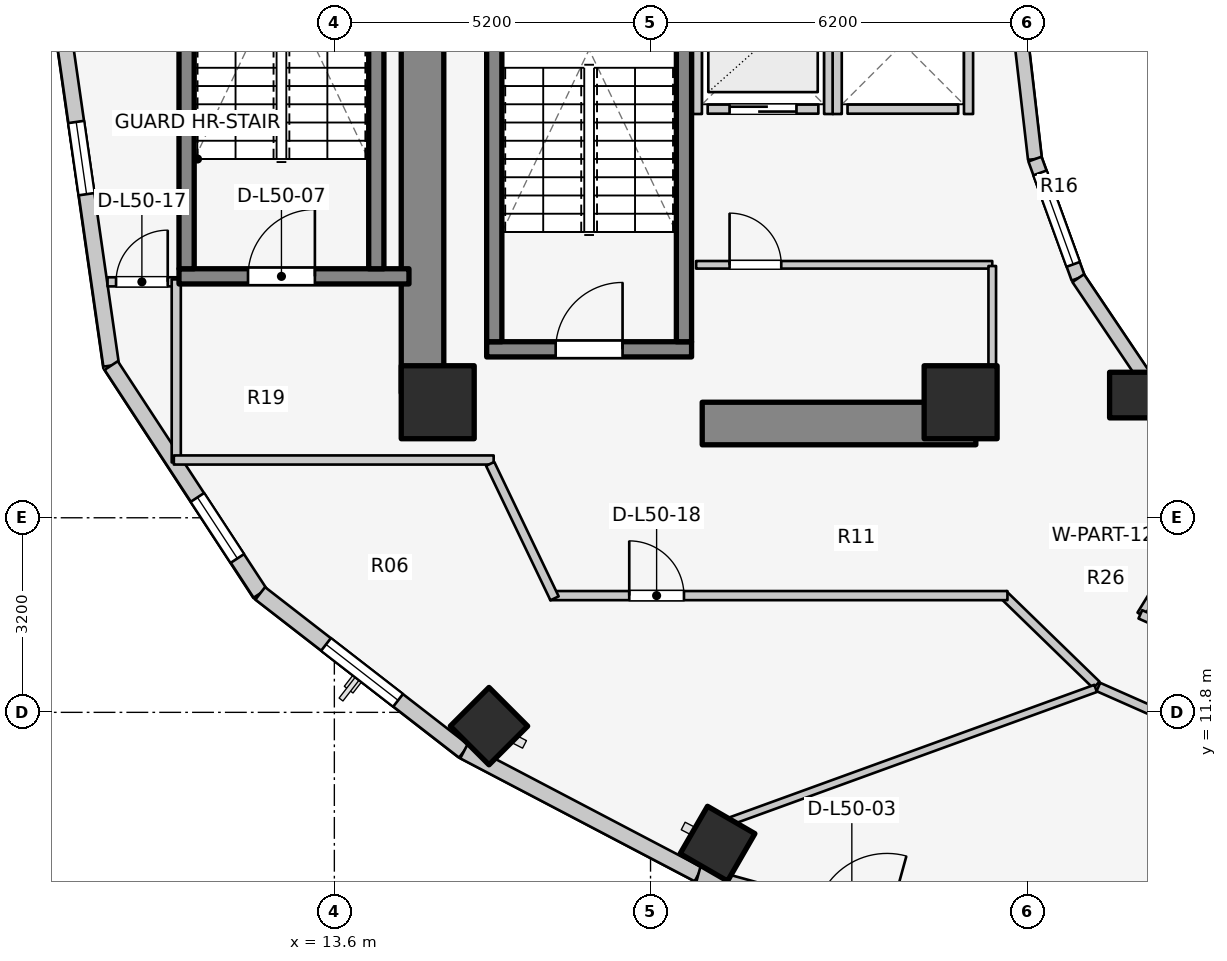
"""IFC4 building model, lengths in metres.
Left out: names, types, materials, properties, quantities, classifications, styles, units other than length and angle.
Written with IfcOpenShell. Run it as: python <this file> out.ifc"""

import sys

from ifc_helpers import new_model, si_unit, direction, frame, frame_2d, origin, origin_2d, place, context, subcontext, project, spatial, rectangle, extrude, element, fill, save


model = new_model("IFC4")
c1 = context("Model", 3, precision=1e-05, world=origin(), true_north=direction((0.0, 1.0)))
c2 = subcontext(c1, "Body", "Model", "MODEL_VIEW")
j1 = project(units=[si_unit("LENGTHUNIT", "METRE"), si_unit("PLANEANGLEUNIT", "RADIAN")], contexts=[c1])
p1 = place(None, origin())
s1 = spatial("IfcSite", under=j1, at=p1, CompositionType="ELEMENT")
p2 = place(p1, origin())
s2 = spatial("IfcBuilding", under=s1, at=p2, CompositionType="ELEMENT")
p3 = place(p2, frame((0.0, 0.0, 165.3)))
s3 = spatial("IfcBuildingStorey", under=s2, at=p3, CompositionType="ELEMENT", Elevation=165.3)
p4 = place(p3, frame((15.05, 17.05, 0.0), z_axis=(0.0, 0.0, 1.0), x_axis=(0.0, 1.0, 0.0)))
e1 = element("IfcWall", 1, at=p4, inside=s3, PredefinedType="SHEAR", context=c2, shape_type="SweptSolid", body=[
    extrude(rectangle(XDim=12.8, YDim=0.7, at=frame_2d((6.4, 0.0))), origin(), (0.0, 0.0, 1.0), 3.1),
])
p5 = place(p3, frame((19.65, 16.55, 0.0), z_axis=(0.0, 0.0, 1.0), x_axis=(1.0, 0.0, 0.0)))
e2 = element("IfcWall", 2, at=p5, inside=s3, PredefinedType="SHEAR", context=c2, shape_type="SweptSolid", body=[
    extrude(rectangle(XDim=4.5, YDim=0.7, at=frame_2d((2.25, 0.0))), origin(), (0.0, 0.0, 1.0), 3.1),
])
p6 = place(p3, frame((16.105, 17.77, 0.0), z_axis=(0.0, 0.0, 1.0), x_axis=(1.0, 0.0, 0.0)))
e3 = element("IfcWall", 3, at=p6, inside=s3, PredefinedType="SOLIDWALL", context=c2, shape_type="SweptSolid", body=[
    extrude(rectangle(XDim=3.37, YDim=0.25, at=frame_2d((1.685, 0.0))), origin(), (0.0, 0.0, 1.0), 3.1),
])
p7 = place(p6, frame((1.135, 0.0, 0.0)))
e4 = element("IfcOpeningElement", 4, at=p7, cuts=e3, PredefinedType="OPENING", context=c2, shape_type="SweptSolid", body=[
    extrude(rectangle(XDim=1.1, YDim=2.1, at=frame_2d((0.55, 1.05))), frame((0.0, 0.135, 0.0), z_axis=(0.0, -1.0, 0.0), x_axis=(1.0, 0.0, 0.0)), (0.0, 0.0, 1.0), 0.27),
])
for number, where, z_axis, x_axis in (
    (5, (16.23, 17.895, 0.0), (0.0, 0.0, 1.0), (0.0, 1.0, 0.0)),
    (6, (19.35, 17.895, 0.0), (0.0, 0.0, 1.0), (0.0, 1.0, 0.0)),
):
    element("IfcWall", number, at=place(p3, frame(where, z_axis=z_axis, x_axis=x_axis)), inside=s3, PredefinedType="SOLIDWALL", context=c2, shape_type="SweptSolid", body=[
        extrude(rectangle(XDim=7.81, YDim=0.25, at=frame_2d((3.905, 0.0))), origin(), (0.0, 0.0, 1.0), 3.1),
    ])
p8 = place(p3, frame((11.045, 18.97, 0.0), z_axis=(0.0, 0.0, 1.0), x_axis=(1.0, 0.0, 0.0)))
e7 = element("IfcWall", 7, at=p8, inside=s3, PredefinedType="SOLIDWALL", context=c2, shape_type="SweptSolid", body=[
    extrude(rectangle(XDim=3.782, YDim=0.25, at=frame_2d((1.891, 0.0))), origin(), (0.0, 0.0, 1.0), 3.1),
])
p9 = place(p8, frame((1.135, 0.0, 0.0)))
e8 = element("IfcOpeningElement", 8, at=p9, cuts=e7, PredefinedType="OPENING", context=c2, shape_type="SweptSolid", body=[
    extrude(rectangle(XDim=1.1, YDim=2.1, at=frame_2d((0.55, 1.05))), frame((0.0, 0.135, 0.0), z_axis=(0.0, -1.0, 0.0), x_axis=(1.0, 0.0, 0.0)), (0.0, 0.0, 1.0), 0.27),
])
for number, where, z_axis, x_axis in (
    (9, (11.17, 19.095, 0.0), (0.0, 0.0, 1.0), (0.0, 1.0, 0.0)),
    (10, (14.29, 19.095, 0.0), (0.0, 0.0, 1.0), (0.0, 1.0, 0.0)),
):
    element("IfcWall", number, at=place(p3, frame(where, z_axis=z_axis, x_axis=x_axis)), inside=s3, PredefinedType="SOLIDWALL", context=c2, shape_type="SweptSolid", body=[
        extrude(rectangle(XDim=7.81, YDim=0.25, at=frame_2d((3.905, 0.0))), origin(), (0.0, 0.0, 1.0), 3.1),
    ])
for number, where, z_axis, x_axis in (
    (11, (15.3, 16.9, 0.0), (0.0, 0.0, 1.0), (1.0, 0.0, 0.0)),
    (12, (23.9, 16.9, 0.0), (0.0, 0.0, 1.0), (1.0, 0.0, 0.0)),
):
    element("IfcColumn", number, at=place(p3, frame(where, z_axis=z_axis, x_axis=x_axis)), inside=s3, PredefinedType="COLUMN", context=c2, shape_type="SweptSolid", body=[
        extrude(rectangle(XDim=1.2, YDim=1.2, at=origin_2d()), origin(), (0.0, 0.0, 1.0), 3.1),
    ])
p10 = place(p3, frame((26.725, 17.018, 0.0), z_axis=(0.0, 0.0, 1.0), x_axis=(1.0, 0.0, 0.0)))
e13 = element("IfcColumn", 13, at=p10, inside=s3, PredefinedType="COLUMN", context=c2, shape_type="SweptSolid", body=[
    extrude(rectangle(XDim=0.75, YDim=0.75, at=origin_2d()), origin(), (0.0, 0.0, 1.0), 3.1),
])
for number, where, z_axis, x_axis in (
    (14, (16.143, 11.573, 0.0), (0.0, 0.0, 1.0), (-0.707, -0.707, 0.0)),
    (15, (19.902, 9.641, 0.0), (0.0, 0.0, 1.0), (-0.5, -0.866, 0.0)),
):
    element("IfcColumn", number, at=place(p3, frame(where, z_axis=z_axis, x_axis=x_axis)), inside=s3, PredefinedType="COLUMN", context=c2, shape_type="SweptSolid", body=[
        extrude(rectangle(XDim=0.9, YDim=0.9, at=origin_2d()), origin(), (0.0, 0.0, 1.0), 3.1),
    ])
p11 = place(p3, frame((24.88, 23.0, 0.0), z_axis=(0.0, 0.0, 1.0), x_axis=(0.114711713601, -0.993398823617, 0.0)))
e16 = element("IfcWall", 16, at=p11, inside=s3, PredefinedType="STANDARD", context=c2, shape_type="SweptSolid", body=[
    extrude(rectangle(XDim=2.115, YDim=0.23, at=frame_2d((1.058, 0.0))), origin(), (0.0, 0.0, 1.0), 2.84),
])
p12 = place(p3, frame((25.123, 20.898, 0.0), z_axis=(0.0, 0.0, 1.0), x_axis=(0.341423187295, -0.93990968033, 0.0)))
e17 = element("IfcWall", 17, at=p12, inside=s3, PredefinedType="STANDARD", context=c2, shape_type="SweptSolid", body=[
    extrude(rectangle(XDim=2.084, YDim=0.23, at=frame_2d((1.042, 0.0))), origin(), (0.0, 0.0, 1.0), 2.84),
])
p13 = place(p12, frame((0.242, 0.0, 0.85)))
e18 = element("IfcOpeningElement", 18, at=p13, cuts=e17, PredefinedType="OPENING", context=c2, shape_type="SweptSolid", body=[
    extrude(rectangle(XDim=1.6, YDim=1.65, at=frame_2d((0.8, 0.825))), frame((0.0, 0.125, 0.0), z_axis=(0.0, -1.0, 0.0), x_axis=(1.0, 0.0, 0.0)), (0.0, 0.0, 1.0), 0.25),
])
p14 = place(p3, frame((25.834, 18.94, 0.0), z_axis=(0.0, 0.0, 1.0), x_axis=(0.558197800898, -0.829707909492, 0.0)))
e19 = element("IfcWall", 19, at=p14, inside=s3, PredefinedType="STANDARD", context=c2, shape_type="SweptSolid", body=[
    extrude(rectangle(XDim=2.027, YDim=0.23, at=frame_2d((1.013, 0.0))), origin(), (0.0, 0.0, 1.0), 2.16),
])
p15 = place(p3, frame((26.965, 17.258, 0.0), z_axis=(0.0, 0.0, 1.0), x_axis=(0.752576694707, -0.658504607869, 0.0)))
e20 = element("IfcWall", 20, at=p15, inside=s3, PredefinedType="STANDARD", context=c2, shape_type="SweptSolid", body=[
    extrude(rectangle(XDim=1.959, YDim=0.23, at=frame_2d((0.98, 0.0))), origin(), (0.0, 0.0, 1.0), 2.16),
])
p16 = place(p3, frame((9.14, 23.0, 0.0), z_axis=(0.0, 0.0, 1.0), x_axis=(0.142227632286, -0.989833976288, 0.0)))
e21 = element("IfcWall", 21, at=p16, inside=s3, PredefinedType="STANDARD", context=c2, shape_type="SweptSolid", body=[
    extrude(rectangle(XDim=5.553, YDim=0.26, at=frame_2d((2.776, 0.0))), origin(), (0.0, 0.0, 1.0), 2.85),
])
p17 = place(p16, frame((1.506, 0.0, 0.75)))
e22 = element("IfcOpeningElement", 22, at=p17, cuts=e21, PredefinedType="OPENING", context=c2, shape_type="SweptSolid", body=[
    extrude(rectangle(XDim=1.2, YDim=1.5, at=frame_2d((0.6, 0.75))), frame((0.0, 0.14, 0.0), z_axis=(0.0, -1.0, 0.0), x_axis=(1.0, 0.0, 0.0)), (0.0, 0.0, 1.0), 0.28),
])
p18 = place(p3, frame((9.93, 17.503, 0.0), z_axis=(0.0, 0.0, 1.0), x_axis=(0.547456494366, -0.836834145322, 0.0)))
e23 = element("IfcWall", 23, at=p18, inside=s3, PredefinedType="STANDARD", context=c2, shape_type="SweptSolid", body=[
    extrude(rectangle(XDim=4.477, YDim=0.26, at=frame_2d((2.239, 0.0))), origin(), (0.0, 0.0, 1.0), 2.85),
])
p19 = place(p18, frame((2.591, 0.0, 0.75)))
e24 = element("IfcOpeningElement", 24, at=p19, cuts=e23, PredefinedType="OPENING", context=c2, shape_type="SweptSolid", body=[
    extrude(rectangle(XDim=1.2, YDim=1.5, at=frame_2d((0.6, 0.75))), frame((0.0, 0.14, 0.0), z_axis=(0.0, -1.0, 0.0), x_axis=(1.0, 0.0, 0.0)), (0.0, 0.0, 1.0), 0.28),
])
p20 = place(p3, frame((12.381, 13.757, 0.0), z_axis=(0.0, 0.0, 1.0), x_axis=(0.790185650662, -0.612867552973, 0.0)))
e25 = element("IfcWall", 25, at=p20, inside=s3, PredefinedType="STANDARD", context=c2, shape_type="SweptSolid", body=[
    extrude(rectangle(XDim=4.239, YDim=0.26, at=frame_2d((2.12, 0.0))), origin(), (0.0, 0.0, 1.0), 2.85),
])
p21 = place(p20, frame((1.37, 0.0, 0.75)))
e26 = element("IfcOpeningElement", 26, at=p21, cuts=e25, PredefinedType="OPENING", context=c2, shape_type="SweptSolid", body=[
    extrude(rectangle(XDim=1.5, YDim=1.6, at=frame_2d((0.75, 0.8))), frame((0.0, 0.14, 0.0), z_axis=(0.0, -1.0, 0.0), x_axis=(1.0, 0.0, 0.0)), (0.0, 0.0, 1.0), 0.28),
])
p22 = place(p3, frame((15.731, 11.158, 0.0), z_axis=(0.0, 0.0, 1.0), x_axis=(0.885660265226, -0.464333818065, 0.0)))
e27 = element("IfcWall", 27, at=p22, inside=s3, PredefinedType="STANDARD", context=c2, shape_type="SweptSolid", body=[
    extrude(rectangle(XDim=4.354, YDim=0.26, at=frame_2d((2.177, 0.0))), origin(), (0.0, 0.0, 1.0), 2.85),
])
p23 = place(p3, frame((19.587, 9.137, 0.0), z_axis=(0.0, 0.0, 1.0), x_axis=(0.963953455704, -0.26607092144, 0.0)))
e28 = element("IfcWall", 28, at=p23, inside=s3, PredefinedType="STANDARD", context=c2, shape_type="SweptSolid", body=[
    extrude(rectangle(XDim=5.237, YDim=0.26, at=frame_2d((2.618, 0.0))), origin(), (0.0, 0.0, 1.0), 2.88),
])
p24 = place(p23, frame((2.018, 0.0, 0.0)))
e29 = element("IfcOpeningElement", 29, at=p24, cuts=e28, PredefinedType="OPENING", context=c2, shape_type="SweptSolid", body=[
    extrude(rectangle(XDim=1.2, YDim=2.2, at=frame_2d((0.6, 1.1))), frame((0.0, 0.14, 0.0), z_axis=(0.0, -1.0, 0.0), x_axis=(1.0, 0.0, 0.0)), (0.0, 0.0, 1.0), 0.28),
])
p25 = place(p3, frame((19.74, 21.72, 0.0), z_axis=(0.0, 0.0, 1.0), x_axis=(1.0, 0.0, 0.0)))
e30 = element("IfcWall", 30, at=p25, inside=s3, PredefinedType="SOLIDWALL", context=c2, shape_type="SweptSolid", body=[
    extrude(rectangle(XDim=1.82, YDim=0.15, at=frame_2d((0.91, 0.0))), origin(), (0.0, 0.0, 1.0), 2.855),
])
p26 = place(p25, frame((0.36, 0.0, 0.0)))
e31 = element("IfcOpeningElement", 31, at=p26, cuts=e30, PredefinedType="OPENING", context=c2, shape_type="SweptSolid", body=[
    extrude(rectangle(XDim=1.1, YDim=2.1, at=frame_2d((0.55, 1.05))), frame((0.0, 0.085, 0.0), z_axis=(0.0, -1.0, 0.0), x_axis=(1.0, 0.0, 0.0)), (0.0, 0.0, 1.0), 0.17),
])
for number, where, z_axis, x_axis in (
    (32, (19.57, 21.64, 0.0), (0.0, 0.0, 1.0), (0.0, 1.0, 0.0)),
    (33, (21.73, 21.64, 0.0), (0.0, 0.0, 1.0), (0.0, 1.0, 0.0)),
):
    element("IfcWall", number, at=place(p3, frame(where, z_axis=z_axis, x_axis=x_axis)), inside=s3, PredefinedType="SOLIDWALL", context=c2, shape_type="SweptSolid", body=[
        extrude(rectangle(XDim=2.32, YDim=0.15, at=frame_2d((1.16, 0.0))), origin(), (0.0, 0.0, 1.0), 2.855),
    ])
p27 = place(p3, frame((22.04, 21.72, 0.0), z_axis=(0.0, 0.0, 1.0), x_axis=(1.0, 0.0, 0.0)))
e34 = element("IfcWall", 34, at=p27, inside=s3, PredefinedType="SOLIDWALL", context=c2, shape_type="SweptSolid", body=[
    extrude(rectangle(XDim=1.82, YDim=0.15, at=frame_2d((0.91, 0.0))), origin(), (0.0, 0.0, 1.0), 2.12),
])
p28 = place(p3, frame((21.87, 21.64, 0.0), z_axis=(0.0, 0.0, 1.0), x_axis=(0.0, 1.0, 0.0)))
e35 = element("IfcWall", 35, at=p28, inside=s3, PredefinedType="SOLIDWALL", context=c2, shape_type="SweptSolid", body=[
    extrude(rectangle(XDim=2.32, YDim=0.15, at=frame_2d((1.16, 0.0))), origin(), (0.0, 0.0, 1.0), 2.855),
])
p29 = place(p3, frame((24.03, 21.64, 0.0), z_axis=(0.0, 0.0, 1.0), x_axis=(0.0, 1.0, 0.0)))
e36 = element("IfcWall", 36, at=p29, inside=s3, PredefinedType="SOLIDWALL", context=c2, shape_type="SweptSolid", body=[
    extrude(rectangle(XDim=2.32, YDim=0.15, at=frame_2d((1.16, 0.0))), origin(), (0.0, 0.0, 1.0), 2.12),
])
p30 = place(p3, frame((19.55, 19.16, 0.0), z_axis=(0.0, 0.0, 1.0), x_axis=(1.0, 0.0, 0.0)))
e37 = element("IfcWall", 37, at=p30, inside=s3, PredefinedType="PARTITIONING", context=c2, shape_type="SweptSolid", body=[
    extrude(rectangle(XDim=4.87, YDim=0.125, at=frame_2d((2.435, 0.0))), origin(), (0.0, 0.0, 1.0), 2.12),
])
p31 = place(p30, frame((0.55, 0.0, 0.0)))
e38 = element("IfcOpeningElement", 38, at=p31, cuts=e37, PredefinedType="OPENING", context=c2, shape_type="SweptSolid", body=[
    extrude(rectangle(XDim=0.85, YDim=2.05, at=frame_2d((0.425, 1.025))), frame((0.0, 0.073, 0.0), z_axis=(0.0, -1.0, 0.0), x_axis=(1.0, 0.0, 0.0)), (0.0, 0.0, 1.0), 0.145),
])
p32 = place(p3, frame((24.42, 17.1, 0.0), z_axis=(0.0, 0.0, 1.0), x_axis=(0.0, 1.0, 0.0)))
e39 = element("IfcWall", 39, at=p32, inside=s3, PredefinedType="PARTITIONING", context=c2, shape_type="SweptSolid", body=[
    extrude(rectangle(XDim=2.04, YDim=0.125, at=frame_2d((1.02, 0.0))), origin(), (0.0, 0.0, 1.0), 2.232),
])
p33 = place(p3, frame((9.87, 18.88, 0.0), z_axis=(0.0, 0.0, 1.0), x_axis=(1.0, 0.0, 0.0)))
e40 = element("IfcWall", 40, at=p33, inside=s3, PredefinedType="PARTITIONING", context=c2, shape_type="SweptSolid", body=[
    extrude(rectangle(XDim=1.17, YDim=0.15, at=frame_2d((0.585, 0.0))), origin(), (0.0, 0.0, 1.0), 2.855),
])
p34 = place(p33, frame((0.14, 0.0, 0.0)))
e41 = element("IfcOpeningElement", 41, at=p34, cuts=e40, PredefinedType="OPENING", context=c2, shape_type="SweptSolid", body=[
    extrude(rectangle(XDim=0.85, YDim=2.05, at=frame_2d((0.425, 1.025))), frame((0.0, 0.085, 0.0), z_axis=(0.0, -1.0, 0.0), x_axis=(1.0, 0.0, 0.0)), (0.0, 0.0, 1.0), 0.17),
])
p35 = place(p3, frame((11.0, 15.91, 0.0), z_axis=(0.0, 0.0, 1.0), x_axis=(0.0, 1.0, 0.0)))
e42 = element("IfcWall", 42, at=p35, inside=s3, PredefinedType="PARTITIONING", context=c2, shape_type="SweptSolid", body=[
    extrude(rectangle(XDim=3.01, YDim=0.15, at=frame_2d((1.505, 0.0))), origin(), (0.0, 0.0, 1.0), 2.855),
])
p36 = place(p3, frame((10.96, 15.95, 0.0), z_axis=(0.0, 0.0, 1.0), x_axis=(1.0, 0.0, 0.0)))
e43 = element("IfcWall", 43, at=p36, inside=s3, PredefinedType="PARTITIONING", context=c2, shape_type="SweptSolid", body=[
    extrude(rectangle(XDim=5.26, YDim=0.15, at=frame_2d((2.63, 0.0))), origin(), (0.0, 0.0, 1.0), 2.22),
])
p37 = place(p3, frame((26.133, 12.251, 0.0), z_axis=(0.0, 0.0, 1.0), x_axis=(-0.717419568599, 0.696641344302, 0.0)))
e44 = element("IfcWall", 44, at=p37, inside=s3, PredefinedType="PARTITIONING", context=c2, shape_type="SweptSolid", body=[
    extrude(rectangle(XDim=2.138, YDim=0.15, at=frame_2d((1.069, 0.0))), origin(), (0.0, 0.0, 1.0), 2.299),
])
p38 = place(p3, frame((17.15, 13.72, 0.0), z_axis=(0.0, 0.0, 1.0), x_axis=(1.0, 0.0, 0.0)))
e45 = element("IfcWall", 45, at=p38, inside=s3, PredefinedType="PARTITIONING", context=c2, shape_type="SweptSolid", body=[
    extrude(rectangle(XDim=7.52, YDim=0.15, at=frame_2d((3.76, 0.0))), origin(), (0.0, 0.0, 1.0), 2.299),
])
p39 = place(p38, frame((1.3, 0.0, 0.0)))
e46 = element("IfcOpeningElement", 46, at=p39, cuts=e45, PredefinedType="OPENING", context=c2, shape_type="SweptSolid", body=[
    extrude(rectangle(XDim=0.9, YDim=2.1, at=frame_2d((0.45, 1.05))), frame((0.0, 0.085, 0.0), z_axis=(0.0, -1.0, 0.0), x_axis=(1.0, 0.0, 0.0)), (0.0, 0.0, 1.0), 0.17),
])
p40 = place(p3, frame((17.222, 13.675, 0.0), z_axis=(0.0, 0.0, 1.0), x_axis=(-0.431973389813, 0.901886351207, 0.0)))
e47 = element("IfcWall", 47, at=p40, inside=s3, PredefinedType="PARTITIONING", context=c2, shape_type="SweptSolid", body=[
    extrude(rectangle(XDim=2.452, YDim=0.15, at=frame_2d((1.226, 0.0))), origin(), (0.0, 0.0, 1.0), 2.855),
])
p41 = place(p3, frame((28.45, 15.985, 0.0), z_axis=(0.0, 0.0, 1.0), x_axis=(-0.524565340045, -0.851370192116, 0.0)))
e48 = element("IfcWall", 48, at=p41, inside=s3, PredefinedType="PARTITIONING", context=c2, shape_type="SweptSolid", body=[
    extrude(rectangle(XDim=3.027, YDim=0.125, at=frame_2d((1.514, 0.0))), origin(), (0.0, 0.0, 1.0), 2.299),
])
p42 = place(p3, frame((26.856, 13.412, 0.0), z_axis=(0.0, 0.0, 1.0), x_axis=(0.912985265053, -0.407992531545, 0.0)))
e49 = element("IfcWall", 49, at=p42, inside=s3, PredefinedType="PARTITIONING", context=c2, shape_type="SweptSolid", body=[
    extrude(rectangle(XDim=2.723, YDim=0.15, at=frame_2d((1.362, 0.0))), origin(), (0.0, 0.0, 1.0), 2.299),
])
p43 = place(p3, frame((26.12, 12.194, 0.0), z_axis=(0.0, 0.0, 1.0), x_axis=(-0.939901628116, -0.341445353557, 0.0)))
e50 = element("IfcWall", 50, at=p43, inside=s3, PredefinedType="PARTITIONING", context=c2, shape_type="SweptSolid", body=[
    extrude(rectangle(XDim=6.387, YDim=0.125, at=frame_2d((3.194, 0.0))), origin(), (0.0, 0.0, 1.0), 2.299),
])
p44 = place(p3, frame((26.165, 12.217, 0.0), z_axis=(0.0, 0.0, 1.0), x_axis=(0.91445214467, -0.404694051239, 0.0)))
e51 = element("IfcWall", 51, at=p44, inside=s3, PredefinedType="PARTITIONING", context=c2, shape_type="SweptSolid", body=[
    extrude(rectangle(XDim=3.091, YDim=0.15, at=frame_2d((1.545, 0.0))), origin(), (0.0, 0.0, 1.0), 2.299),
])
p45 = place(p13, origin())
e52 = element("IfcWindow", 52, at=p45, inside=s3, PartitioningType="SINGLE_PANEL", PredefinedType="WINDOW", context=c2, shape_type="SweptSolid", body=[
    extrude(rectangle(XDim=1.6, YDim=1.65, at=frame_2d((0.8, 0.825))), frame((0.0, 0.03, 0.0), z_axis=(0.0, -1.0, 0.0), x_axis=(1.0, 0.0, 0.0)), (0.0, 0.0, 1.0), 0.06),
])
fill(e18, e52)
p46 = place(p17, origin())
e53 = element("IfcWindow", 53, at=p46, inside=s3, PartitioningType="SINGLE_PANEL", PredefinedType="WINDOW", context=c2, shape_type="SweptSolid", body=[
    extrude(rectangle(XDim=1.2, YDim=1.5, at=frame_2d((0.6, 0.75))), frame((0.0, 0.03, 0.0), z_axis=(0.0, -1.0, 0.0), x_axis=(1.0, 0.0, 0.0)), (0.0, 0.0, 1.0), 0.06),
])
fill(e22, e53)
p47 = place(p19, origin())
e54 = element("IfcWindow", 54, at=p47, inside=s3, PartitioningType="SINGLE_PANEL", PredefinedType="WINDOW", context=c2, shape_type="SweptSolid", body=[
    extrude(rectangle(XDim=1.2, YDim=1.5, at=frame_2d((0.6, 0.75))), frame((0.0, 0.03, 0.0), z_axis=(0.0, -1.0, 0.0), x_axis=(1.0, 0.0, 0.0)), (0.0, 0.0, 1.0), 0.06),
])
fill(e24, e54)
p48 = place(p21, origin())
e55 = element("IfcWindow", 55, at=p48, inside=s3, PartitioningType="SINGLE_PANEL", PredefinedType="WINDOW", context=c2, shape_type="SweptSolid", body=[
    extrude(rectangle(XDim=1.5, YDim=1.6, at=frame_2d((0.75, 0.8))), frame((0.0, 0.03, 0.0), z_axis=(0.0, -1.0, 0.0), x_axis=(1.0, 0.0, 0.0)), (0.0, 0.0, 1.0), 0.06),
])
fill(e26, e55)
p49 = place(p7, origin())
e56 = element("IfcDoor", 56, at=p49, inside=s3, OperationType="SINGLE_SWING_RIGHT", PredefinedType="DOOR", context=c2, shape_type="SweptSolid", body=[
    extrude(rectangle(XDim=1.1, YDim=2.1, at=frame_2d((0.55, 1.05))), frame((0.0, 0.025, 0.0), z_axis=(0.0, -1.0, 0.0), x_axis=(1.0, 0.0, 0.0)), (0.0, 0.0, 1.0), 0.05),
])
fill(e4, e56)
p50 = place(p9, origin())
e57 = element("IfcDoor", 57, at=p50, inside=s3, OperationType="SINGLE_SWING_RIGHT", PredefinedType="DOOR", context=c2, shape_type="SweptSolid", body=[
    extrude(rectangle(XDim=1.1, YDim=2.1, at=frame_2d((0.55, 1.05))), frame((0.0, 0.025, 0.0), z_axis=(0.0, -1.0, 0.0), x_axis=(1.0, 0.0, 0.0)), (0.0, 0.0, 1.0), 0.05),
])
fill(e8, e57)
p51 = place(p26, origin())
e58 = element("IfcDoor", 58, at=p51, inside=s3, OperationType="DOUBLE_DOOR_SLIDING", PredefinedType="DOOR", context=c2, shape_type="SweptSolid", body=[
    extrude(rectangle(XDim=1.1, YDim=2.1, at=frame_2d((0.55, 1.05))), frame((0.0, 0.025, 0.0), z_axis=(0.0, -1.0, 0.0), x_axis=(1.0, 0.0, 0.0)), (0.0, 0.0, 1.0), 0.05),
])
fill(e31, e58)
p52 = place(p31, origin())
e59 = element("IfcDoor", 59, at=p52, inside=s3, OperationType="SINGLE_SWING_LEFT", PredefinedType="DOOR", context=c2, shape_type="SweptSolid", body=[
    extrude(rectangle(XDim=0.85, YDim=2.05, at=frame_2d((0.425, 1.025))), frame((0.0, 0.025, 0.0), z_axis=(0.0, -1.0, 0.0), x_axis=(1.0, 0.0, 0.0)), (0.0, 0.0, 1.0), 0.05),
])
fill(e38, e59)
p53 = place(p34, origin())
e60 = element("IfcDoor", 60, at=p53, inside=s3, OperationType="SINGLE_SWING_RIGHT", PredefinedType="DOOR", context=c2, shape_type="SweptSolid", body=[
    extrude(rectangle(XDim=0.85, YDim=2.05, at=frame_2d((0.425, 1.025))), frame((0.0, 0.025, 0.0), z_axis=(0.0, -1.0, 0.0), x_axis=(1.0, 0.0, 0.0)), (0.0, 0.0, 1.0), 0.05),
])
fill(e41, e60)
p54 = place(p39, origin())
e61 = element("IfcDoor", 61, at=p54, inside=s3, OperationType="SINGLE_SWING_LEFT", PredefinedType="DOOR", context=c2, shape_type="SweptSolid", body=[
    extrude(rectangle(XDim=0.9, YDim=2.1, at=frame_2d((0.45, 1.05))), frame((0.0, 0.025, 0.0), z_axis=(0.0, -1.0, 0.0), x_axis=(1.0, 0.0, 0.0)), (0.0, 0.0, 1.0), 0.05),
])
fill(e46, e61)
save(model, sys.argv[1])
